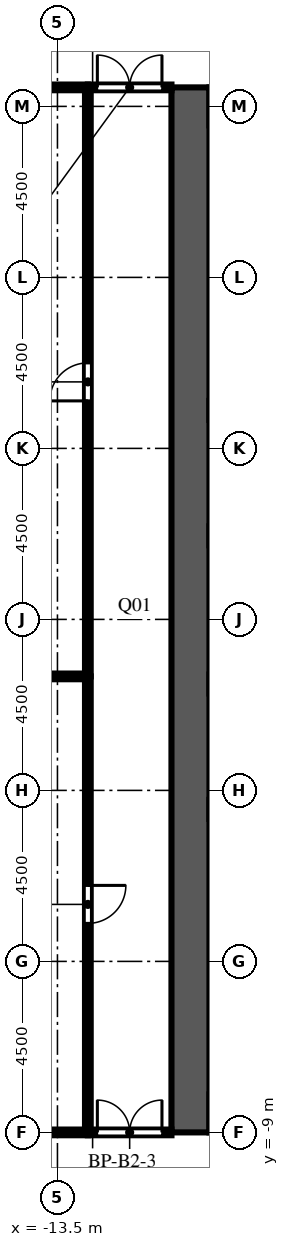
"""IFC4 building model, lengths in metres.
Left out: names, types, materials, properties, quantities, classifications, styles, units other than length and angle.
Written with IfcOpenShell. Run it as: python <this file> out.ifc"""

import sys

from ifc_helpers import new_model, si_unit, direction, frame, frame_2d, origin, place, context, subcontext, project, spatial, rectangle, extrude, element, fill, save


model = new_model("IFC4")
c1 = context("Model", 3, precision=1e-05, world=origin(), true_north=direction((0.0, 1.0)))
c2 = subcontext(c1, "Body", "Model", "MODEL_VIEW")
j1 = project(units=[si_unit("LENGTHUNIT", "METRE"), si_unit("PLANEANGLEUNIT", "RADIAN")], contexts=[c1])
p1 = place(None, origin())
s1 = spatial("IfcSite", under=j1, at=p1, CompositionType="ELEMENT")
p2 = place(p1, origin())
s2 = spatial("IfcBuilding", under=s1, at=p2, CompositionType="ELEMENT")
p3 = place(p2, frame((0.0, 0.0, -10.0)))
s3 = spatial("IfcBuildingStorey", under=s2, at=p3, CompositionType="ELEMENT", Elevation=-10.0)
p4 = place(p3, frame((-10.0, -9.0, 0.0), z_axis=(0.0, 0.0, 1.0), x_axis=(0.0, 1.0, 0.0)))
e1 = element("IfcWall", 1, at=p4, inside=s3, PredefinedType="SHEAR", context=c2, shape_type="SweptSolid", body=[
    extrude(rectangle(XDim=27.5, YDim=1.0, at=frame_2d((13.75, 0.0))), origin(), (0.0, 0.0, 1.0), 5.0),
])
p5 = place(p4, frame((12.55, 0.0, 0.0)))
e2 = element("IfcOpeningElement", 2, at=p5, cuts=e1, PredefinedType="OPENING", context=c2, shape_type="SweptSolid", body=[
    extrude(rectangle(XDim=2.4, YDim=2.4, at=frame_2d((1.2, 1.2))), frame((0.0, 0.51, 0.0), z_axis=(0.0, -1.0, 0.0), x_axis=(1.0, 0.0, 0.0)), (0.0, 0.0, 1.0), 1.02),
])
p6 = place(p4, frame((6.825, 0.0, 0.0)))
e3 = element("IfcOpeningElement", 3, at=p6, cuts=e1, PredefinedType="OPENING", context=c2, shape_type="SweptSolid", body=[
    extrude(rectangle(XDim=1.2, YDim=2.1, at=frame_2d((0.6, 1.05))), frame((0.0, 0.51, 0.0), z_axis=(0.0, -1.0, 0.0), x_axis=(1.0, 0.0, 0.0)), (0.0, 0.0, 1.0), 1.02),
])
p7 = place(p4, frame((19.475, 0.0, 0.0)))
e4 = element("IfcOpeningElement", 4, at=p7, cuts=e1, PredefinedType="OPENING", context=c2, shape_type="SweptSolid", body=[
    extrude(rectangle(XDim=1.2, YDim=2.1, at=frame_2d((0.6, 1.05))), frame((0.0, 0.51, 0.0), z_axis=(0.0, -1.0, 0.0), x_axis=(1.0, 0.0, 0.0)), (0.0, 0.0, 1.0), 1.02),
])
p8 = place(p3, frame((-12.7, -9.0, 0.0), z_axis=(0.0, 0.0, 1.0), x_axis=(1.0, 0.0, 0.0)))
e5 = element("IfcWall", 5, at=p8, inside=s3, PredefinedType="PARTITIONING", context=c2, shape_type="SweptSolid", body=[
    extrude(rectangle(XDim=2.2, YDim=0.15, at=frame_2d((1.1, 0.0))), origin(), (0.0, 0.0, 1.0), 4.6),
])
p9 = place(p8, frame((0.25, 0.0, 0.0)))
e6 = element("IfcOpeningElement", 6, at=p9, cuts=e5, PredefinedType="OPENING", context=c2, shape_type="SweptSolid", body=[
    extrude(rectangle(XDim=1.7, YDim=2.1, at=frame_2d((0.85, 1.05))), frame((0.0, 0.085, 0.0), z_axis=(0.0, -1.0, 0.0), x_axis=(1.0, 0.0, 0.0)), (0.0, 0.0, 1.0), 0.17),
])
p10 = place(p3, frame((-12.7, 18.5, 0.0), z_axis=(0.0, 0.0, 1.0), x_axis=(1.0, 0.0, 0.0)))
e7 = element("IfcWall", 7, at=p10, inside=s3, PredefinedType="PARTITIONING", context=c2, shape_type="SweptSolid", body=[
    extrude(rectangle(XDim=2.2, YDim=0.15, at=frame_2d((1.1, 0.0))), origin(), (0.0, 0.0, 1.0), 4.6),
])
p11 = place(p10, frame((0.25, 0.0, 0.0)))
e8 = element("IfcOpeningElement", 8, at=p11, cuts=e7, PredefinedType="OPENING", context=c2, shape_type="SweptSolid", body=[
    extrude(rectangle(XDim=1.7, YDim=2.1, at=frame_2d((0.85, 1.05))), frame((0.0, 0.085, 0.0), z_axis=(0.0, -1.0, 0.0), x_axis=(1.0, 0.0, 0.0)), (0.0, 0.0, 1.0), 0.17),
])
p12 = place(p3, frame((-12.7, -9.0, 0.0), z_axis=(0.0, 0.0, 1.0), x_axis=(0.0, 1.0, 0.0)))
e9 = element("IfcWall", 9, at=p12, inside=s3, PredefinedType="PARTITIONING", context=c2, shape_type="SweptSolid", body=[
    extrude(rectangle(XDim=12.0, YDim=0.15, at=frame_2d((6.0, 0.0))), origin(), (0.0, 0.0, 1.0), 4.6),
])
p13 = place(p12, frame((5.5, 0.0, 0.0)))
e10 = element("IfcOpeningElement", 10, at=p13, cuts=e9, PredefinedType="OPENING", context=c2, shape_type="SweptSolid", body=[
    extrude(rectangle(XDim=1.0, YDim=2.1, at=frame_2d((0.5, 1.05))), frame((0.0, 0.085, 0.0), z_axis=(0.0, -1.0, 0.0), x_axis=(1.0, 0.0, 0.0)), (0.0, 0.0, 1.0), 0.17),
])
p14 = place(p3, frame((-12.7, 3.0, 0.0), z_axis=(0.0, 0.0, 1.0), x_axis=(0.0, 1.0, 0.0)))
e11 = element("IfcWall", 11, at=p14, inside=s3, PredefinedType="PARTITIONING", context=c2, shape_type="SweptSolid", body=[
    extrude(rectangle(XDim=15.5, YDim=0.15, at=frame_2d((7.75, 0.0))), origin(), (0.0, 0.0, 1.0), 4.6),
])
p15 = place(p14, frame((7.25, 0.0, 0.0)))
e12 = element("IfcOpeningElement", 12, at=p15, cuts=e11, PredefinedType="OPENING", context=c2, shape_type="SweptSolid", body=[
    extrude(rectangle(XDim=1.0, YDim=2.1, at=frame_2d((0.5, 1.05))), frame((0.0, 0.085, 0.0), z_axis=(0.0, -1.0, 0.0), x_axis=(1.0, 0.0, 0.0)), (0.0, 0.0, 1.0), 0.17),
])
for number, where, z_axis, x_axis in (
    (13, (-17.15, -9.0, 0.0), (0.0, 0.0, 1.0), (1.0, 0.0, 0.0)),
    (14, (-17.15, 18.5, 0.0), (0.0, 0.0, 1.0), (1.0, 0.0, 0.0)),
):
    element("IfcWall", number, at=place(p3, frame(where, z_axis=z_axis, x_axis=x_axis)), inside=s3, PredefinedType="PARTITIONING", context=c2, shape_type="SweptSolid", body=[
        extrude(rectangle(XDim=4.45, YDim=0.15, at=frame_2d((2.225, 0.0))), origin(), (0.0, 0.0, 1.0), 4.6),
    ])
p16 = place(p3, frame((-31.2, 3.0, 0.0), z_axis=(0.0, 0.0, 1.0), x_axis=(1.0, 0.0, 0.0)))
e15 = element("IfcWall", 15, at=p16, inside=s3, PredefinedType="PARTITIONING", context=c2, shape_type="SweptSolid", body=[
    extrude(rectangle(XDim=18.5, YDim=0.15, at=frame_2d((9.25, 0.0))), origin(), (0.0, 0.0, 1.0), 4.6),
])
p17 = place(p5, origin())
e16 = element("IfcDoor", 16, at=p17, inside=s3, OperationType="DOUBLE_DOOR_DOUBLE_SWING", PredefinedType="DOOR", context=c2, shape_type="SweptSolid", body=[
    extrude(rectangle(XDim=2.4, YDim=2.4, at=frame_2d((1.2, 1.2))), frame((0.0, 0.025, 0.0), z_axis=(0.0, -1.0, 0.0), x_axis=(1.0, 0.0, 0.0)), (0.0, 0.0, 1.0), 0.05),
])
fill(e2, e16)
p18 = place(p6, origin())
e17 = element("IfcDoor", 17, at=p18, inside=s3, OperationType="SINGLE_SWING_LEFT", PredefinedType="DOOR", context=c2, shape_type="SweptSolid", body=[
    extrude(rectangle(XDim=1.2, YDim=2.1, at=frame_2d((0.6, 1.05))), frame((0.0, 0.025, 0.0), z_axis=(0.0, -1.0, 0.0), x_axis=(1.0, 0.0, 0.0)), (0.0, 0.0, 1.0), 0.05),
])
fill(e3, e17)
p19 = place(p7, origin())
e18 = element("IfcDoor", 18, at=p19, inside=s3, OperationType="SINGLE_SWING_LEFT", PredefinedType="DOOR", context=c2, shape_type="SweptSolid", body=[
    extrude(rectangle(XDim=1.2, YDim=2.1, at=frame_2d((0.6, 1.05))), frame((0.0, 0.025, 0.0), z_axis=(0.0, -1.0, 0.0), x_axis=(1.0, 0.0, 0.0)), (0.0, 0.0, 1.0), 0.05),
])
fill(e4, e18)
p20 = place(p13, origin())
e19 = element("IfcDoor", 19, at=p20, inside=s3, OperationType="SINGLE_SWING_RIGHT", PredefinedType="DOOR", context=c2, shape_type="SweptSolid", body=[
    extrude(rectangle(XDim=1.0, YDim=2.1, at=frame_2d((0.5, 1.05))), frame((0.0, 0.025, 0.0), z_axis=(0.0, -1.0, 0.0), x_axis=(1.0, 0.0, 0.0)), (0.0, 0.0, 1.0), 0.05),
])
fill(e10, e19)
p21 = place(p15, origin())
e20 = element("IfcDoor", 20, at=p21, inside=s3, OperationType="SINGLE_SWING_LEFT", PredefinedType="DOOR", context=c2, shape_type="SweptSolid", body=[
    extrude(rectangle(XDim=1.0, YDim=2.1, at=frame_2d((0.5, 1.05))), frame((0.0, 0.025, 0.0), z_axis=(0.0, -1.0, 0.0), x_axis=(1.0, 0.0, 0.0)), (0.0, 0.0, 1.0), 0.05),
])
fill(e12, e20)
p22 = place(p9, origin())
e21 = element("IfcDoor", 21, at=p22, inside=s3, OperationType="DOUBLE_DOOR_DOUBLE_SWING", PredefinedType="DOOR", context=c2, shape_type="SweptSolid", body=[
    extrude(rectangle(XDim=1.7, YDim=2.1, at=frame_2d((0.85, 1.05))), frame((0.0, 0.025, 0.0), z_axis=(0.0, -1.0, 0.0), x_axis=(1.0, 0.0, 0.0)), (0.0, 0.0, 1.0), 0.05),
])
fill(e6, e21)
p23 = place(p11, origin())
e22 = element("IfcDoor", 22, at=p23, inside=s3, OperationType="DOUBLE_DOOR_DOUBLE_SWING", PredefinedType="DOOR", context=c2, shape_type="SweptSolid", body=[
    extrude(rectangle(XDim=1.7, YDim=2.1, at=frame_2d((0.85, 1.05))), frame((0.0, 0.025, 0.0), z_axis=(0.0, -1.0, 0.0), x_axis=(1.0, 0.0, 0.0)), (0.0, 0.0, 1.0), 0.05),
])
fill(e8, e22)
save(model, sys.argv[1])
